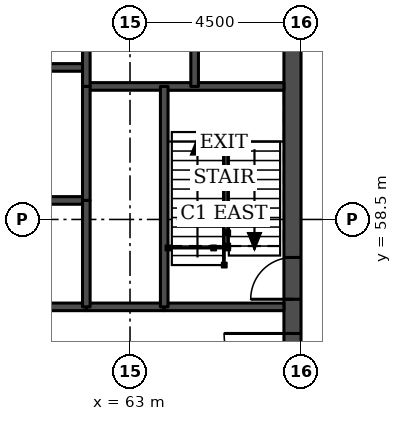
"""IFC4 building model, lengths in metres.
Left out: names, types, materials, properties, quantities, classifications, styles, units other than length and angle.
Written with IfcOpenShell. Run it as: python <this file> out.ifc"""

import sys

from ifc_helpers import new_model, si_unit, direction, frame, frame_2d, origin, place, context, subcontext, project, spatial, rectangle, extrude, element, fill, save


model = new_model("IFC4")
c1 = context("Model", 3, precision=1e-05, world=origin(), true_north=direction((0.0, 1.0)))
c2 = subcontext(c1, "Body", "Model", "MODEL_VIEW")
j1 = project(units=[si_unit("LENGTHUNIT", "METRE"), si_unit("PLANEANGLEUNIT", "RADIAN")], contexts=[c1])
p1 = place(None, origin())
s1 = spatial("IfcSite", under=j1, at=p1, CompositionType="ELEMENT")
p2 = place(p1, origin())
s2 = spatial("IfcBuilding", under=s1, at=p2, CompositionType="ELEMENT")
p3 = place(p2, frame((0.0, 0.0, 119.6)))
s3 = spatial("IfcBuildingStorey", under=s2, at=p3, CompositionType="ELEMENT", Elevation=119.6)
p4 = place(p3, frame((67.275, 49.5, 0.0), z_axis=(0.0, 0.0, 1.0), x_axis=(0.0, 1.0, 0.0)))
e1 = element("IfcWall", 1, at=p4, inside=s3, PredefinedType="SHEAR", context=c2, shape_type="SweptSolid", body=[
    extrude(rectangle(XDim=22.5, YDim=0.45, at=frame_2d((11.25, 0.0))), origin(), (0.0, 0.0, 1.0), 3.7),
])
p5 = place(p4, frame((4.2, 0.0, 0.0)))
e2 = element("IfcOpeningElement", 2, at=p5, cuts=e1, PredefinedType="OPENING", context=c2, shape_type="SweptSolid", body=[
    extrude(rectangle(XDim=1.8, YDim=2.1, at=frame_2d((0.9, 1.05))), frame((0.0, 0.235, 0.0), z_axis=(0.0, -1.0, 0.0), x_axis=(1.0, 0.0, 0.0)), (0.0, 0.0, 1.0), 0.47),
])
p6 = place(p4, frame((6.9, 0.0, 0.0)))
e3 = element("IfcOpeningElement", 3, at=p6, cuts=e1, PredefinedType="OPENING", context=c2, shape_type="SweptSolid", body=[
    extrude(rectangle(XDim=1.1, YDim=2.1, at=frame_2d((0.55, 1.05))), frame((0.0, 0.235, 0.0), z_axis=(0.0, -1.0, 0.0), x_axis=(1.0, 0.0, 0.0)), (0.0, 0.0, 1.0), 0.47),
])
p7 = place(p4, frame((13.6, 0.0, 0.0)))
e4 = element("IfcOpeningElement", 4, at=p7, cuts=e1, PredefinedType="OPENING", context=c2, shape_type="SweptSolid", body=[
    extrude(rectangle(XDim=1.1, YDim=2.1, at=frame_2d((0.55, 1.05))), frame((0.0, 0.235, 0.0), z_axis=(0.0, -1.0, 0.0), x_axis=(1.0, 0.0, 0.0)), (0.0, 0.0, 1.0), 0.47),
])
p8 = place(p4, frame((16.5, 0.0, 0.0)))
e5 = element("IfcOpeningElement", 5, at=p8, cuts=e1, PredefinedType="OPENING", context=c2, shape_type="SweptSolid", body=[
    extrude(rectangle(XDim=1.8, YDim=2.1, at=frame_2d((0.9, 1.05))), frame((0.0, 0.235, 0.0), z_axis=(0.0, -1.0, 0.0), x_axis=(1.0, 0.0, 0.0)), (0.0, 0.0, 1.0), 0.47),
])
p9 = place(p3, frame((61.85, 56.2, 0.0), z_axis=(0.0, 0.0, 1.0), x_axis=(1.0, 0.0, 0.0)))
e6 = element("IfcWall", 6, at=p9, inside=s3, PredefinedType="SOLIDWALL", context=c2, shape_type="SweptSolid", body=[
    extrude(rectangle(XDim=2.05, YDim=0.2, at=frame_2d((1.025, 0.0))), origin(), (0.0, 0.0, 1.0), 3.55),
])
p10 = place(p3, frame((50.65, 56.2, 0.0), z_axis=(0.0, 0.0, 1.0), x_axis=(1.0, 0.0, 0.0)))
e7 = element("IfcWall", 7, at=p10, inside=s3, PredefinedType="SOLIDWALL", context=c2, shape_type="SweptSolid", body=[
    extrude(rectangle(XDim=11.2, YDim=0.2, at=frame_2d((5.6, 0.0))), origin(), (0.0, 0.0, 1.0), 3.55),
])
p11 = place(p3, frame((63.9, 56.2, 0.0), z_axis=(0.0, 0.0, 1.0), x_axis=(1.0, 0.0, 0.0)))
e8 = element("IfcWall", 8, at=p11, inside=s3, PredefinedType="SOLIDWALL", context=c2, shape_type="SweptSolid", body=[
    extrude(rectangle(XDim=3.15, YDim=0.2, at=frame_2d((1.575, 0.0))), origin(), (0.0, 0.0, 1.0), 3.55),
])
p12 = place(p3, frame((50.65, 59.0, 0.0), z_axis=(0.0, 0.0, 1.0), x_axis=(1.0, 0.0, 0.0)))
e9 = element("IfcWall", 9, at=p12, inside=s3, PredefinedType="SOLIDWALL", context=c2, shape_type="SweptSolid", body=[
    extrude(rectangle(XDim=11.2, YDim=0.2, at=frame_2d((5.6, 0.0))), origin(), (0.0, 0.0, 1.0), 3.7),
])
p13 = place(p3, frame((61.85, 62.0, 0.0), z_axis=(0.0, 0.0, 1.0), x_axis=(1.0, 0.0, 0.0)))
e10 = element("IfcWall", 10, at=p13, inside=s3, PredefinedType="SOLIDWALL", context=c2, shape_type="SweptSolid", body=[
    extrude(rectangle(XDim=5.2, YDim=0.2, at=frame_2d((2.6, 0.0))), origin(), (0.0, 0.0, 1.0), 3.55),
])
p14 = place(p3, frame((50.65, 62.5, 0.0), z_axis=(0.0, 0.0, 1.0), x_axis=(1.0, 0.0, 0.0)))
e11 = element("IfcWall", 11, at=p14, inside=s3, PredefinedType="SOLIDWALL", context=c2, shape_type="SweptSolid", body=[
    extrude(rectangle(XDim=11.2, YDim=0.2, at=frame_2d((5.6, 0.0))), origin(), (0.0, 0.0, 1.0), 3.7),
])
p15 = place(p3, frame((61.85, 59.0, 0.0), z_axis=(0.0, 0.0, 1.0), x_axis=(0.0, 1.0, 0.0)))
e12 = element("IfcWall", 12, at=p15, inside=s3, PredefinedType="SOLIDWALL", context=c2, shape_type="SweptSolid", body=[
    extrude(rectangle(XDim=3.0, YDim=0.2, at=frame_2d((1.5, 0.0))), origin(), (0.0, 0.0, 1.0), 3.7),
])
p16 = place(p3, frame((61.85, 56.2, 0.0), z_axis=(0.0, 0.0, 1.0), x_axis=(0.0, 1.0, 0.0)))
e13 = element("IfcWall", 13, at=p16, inside=s3, PredefinedType="SOLIDWALL", context=c2, shape_type="SweptSolid", body=[
    extrude(rectangle(XDim=2.8, YDim=0.2, at=frame_2d((1.4, 0.0))), origin(), (0.0, 0.0, 1.0), 3.55),
])
p17 = place(p3, frame((61.85, 62.0, 0.0), z_axis=(0.0, 0.0, 1.0), x_axis=(0.0, 1.0, 0.0)))
e14 = element("IfcWall", 14, at=p17, inside=s3, PredefinedType="SOLIDWALL", context=c2, shape_type="SweptSolid", body=[
    extrude(rectangle(XDim=3.3, YDim=0.2, at=frame_2d((1.65, 0.0))), origin(), (0.0, 0.0, 1.0), 3.55),
])
p18 = place(p3, frame((63.9, 56.2, 0.0), z_axis=(0.0, 0.0, 1.0), x_axis=(0.0, 1.0, 0.0)))
e15 = element("IfcWall", 15, at=p18, inside=s3, PredefinedType="SOLIDWALL", context=c2, shape_type="SweptSolid", body=[
    extrude(rectangle(XDim=5.8, YDim=0.2, at=frame_2d((2.9, 0.0))), origin(), (0.0, 0.0, 1.0), 3.55),
])
p19 = place(p3, frame((64.7, 62.0, 0.0), z_axis=(0.0, 0.0, 1.0), x_axis=(0.0, 1.0, 0.0)))
e16 = element("IfcWall", 16, at=p19, inside=s3, PredefinedType="SOLIDWALL", context=c2, shape_type="SweptSolid", body=[
    extrude(rectangle(XDim=3.3, YDim=0.2, at=frame_2d((1.65, 0.0))), origin(), (0.0, 0.0, 1.0), 3.55),
])
p20 = place(p19, frame((1.1, 0.0, 0.0)))
e17 = element("IfcOpeningElement", 17, at=p20, cuts=e16, PredefinedType="OPENING", context=c2, shape_type="SweptSolid", body=[
    extrude(rectangle(XDim=1.1, YDim=2.1, at=frame_2d((0.55, 1.05))), frame((0.0, 0.11, 0.0), z_axis=(0.0, -1.0, 0.0), x_axis=(1.0, 0.0, 0.0)), (0.0, 0.0, 1.0), 0.22),
])
p21 = place(p5, origin())
e18 = element("IfcDoor", 18, at=p21, inside=s3, OperationType="SINGLE_SWING_RIGHT", PredefinedType="DOOR", context=c2, shape_type="SweptSolid", body=[
    extrude(rectangle(XDim=1.8, YDim=2.1, at=frame_2d((0.9, 1.05))), frame((0.0, 0.025, 0.0), z_axis=(0.0, -1.0, 0.0), x_axis=(1.0, 0.0, 0.0)), (0.0, 0.0, 1.0), 0.05),
])
fill(e2, e18)
p22 = place(p6, origin())
e19 = element("IfcDoor", 19, at=p22, inside=s3, OperationType="SINGLE_SWING_LEFT", PredefinedType="DOOR", context=c2, shape_type="SweptSolid", body=[
    extrude(rectangle(XDim=1.1, YDim=2.1, at=frame_2d((0.55, 1.05))), frame((0.0, 0.025, 0.0), z_axis=(0.0, -1.0, 0.0), x_axis=(1.0, 0.0, 0.0)), (0.0, 0.0, 1.0), 0.05),
])
fill(e3, e19)
save(model, sys.argv[1])
